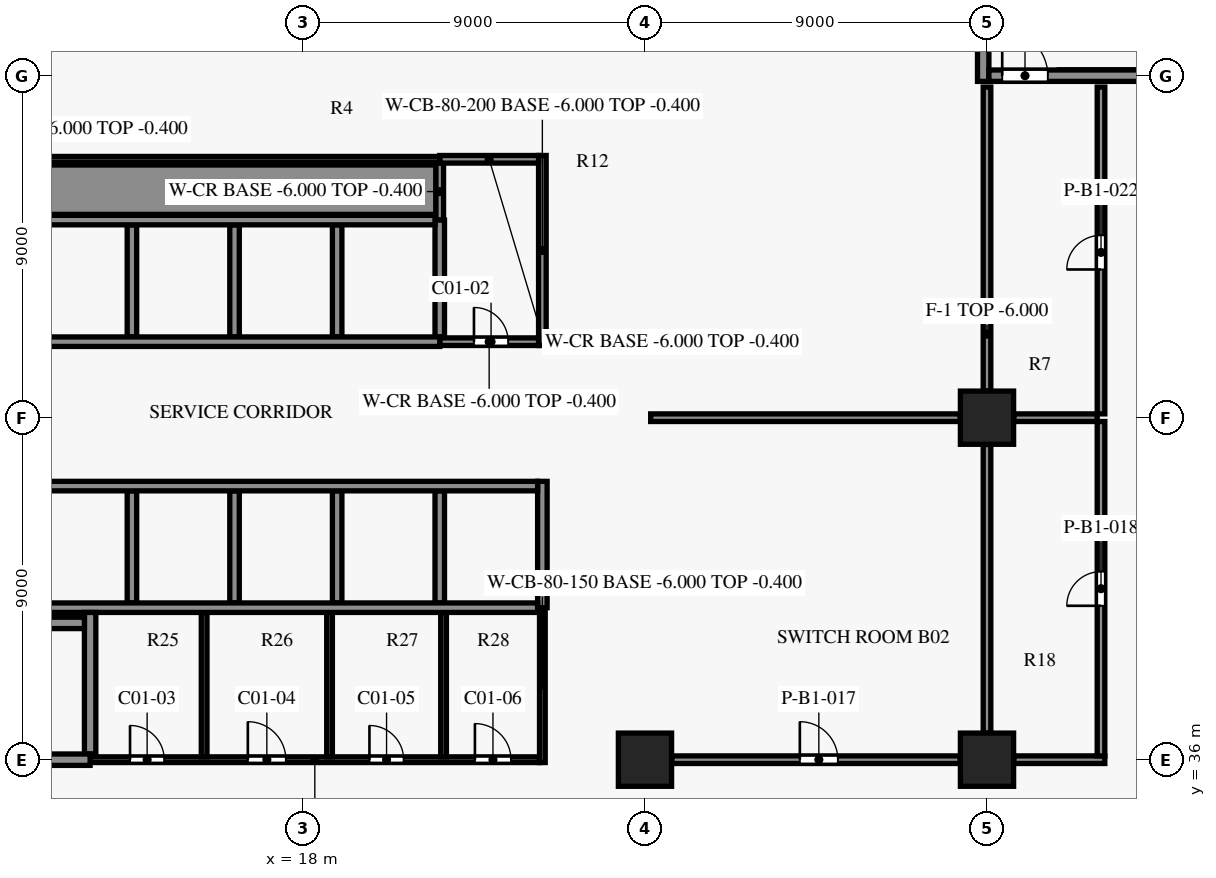
"""IFC4 building model, lengths in metres.
Left out: names, types, materials, properties, quantities, classifications, styles, units other than length and angle.
Written with IfcOpenShell. Run it as: python <this file> out.ifc"""

import sys

from ifc_helpers import new_model, si_unit, direction, frame, frame_2d, origin, origin_2d, place, context, subcontext, project, spatial, rectangle, extrude, element, fill, save


model = new_model("IFC4")
c1 = context("Model", 3, precision=1e-05, world=origin(), true_north=direction((0.0, 1.0)))
c2 = subcontext(c1, "Body", "Model", "MODEL_VIEW")
j1 = project(units=[si_unit("LENGTHUNIT", "METRE"), si_unit("PLANEANGLEUNIT", "RADIAN")], contexts=[c1])
p1 = place(None, origin())
s1 = spatial("IfcSite", under=j1, at=p1, CompositionType="ELEMENT")
p2 = place(p1, origin())
s2 = spatial("IfcBuilding", under=s1, at=p2, CompositionType="ELEMENT")
p3 = place(p2, frame((0.0, 0.0, -6.0)))
s3 = spatial("IfcBuildingStorey", under=s2, at=p3, CompositionType="ELEMENT", Elevation=-6.0)
for number, where, z_axis, x_axis in (
    (1, (27.0, 36.0, 0.0), (0.0, 0.0, 1.0), (1.0, 0.0, 0.0)),
    (2, (36.0, 36.0, 0.0), (0.0, 0.0, 1.0), (1.0, 0.0, 0.0)),
    (3, (36.0, 45.0, 0.0), (0.0, 0.0, 1.0), (1.0, 0.0, 0.0)),
):
    element("IfcColumn", number, at=place(p3, frame(where, z_axis=z_axis, x_axis=x_axis)), inside=s3, PredefinedType="COLUMN", context=c2, shape_type="SweptSolid", body=[
        extrude(rectangle(XDim=1.4, YDim=1.4, at=origin_2d()), origin(), (0.0, 0.0, 1.0), 6.0),
    ])
p4 = place(p3, frame((12.4, 36.0, 0.0), z_axis=(0.0, 0.0, 1.0), x_axis=(1.0, 0.0, 0.0)))
e4 = element("IfcWall", 4, at=p4, inside=s3, PredefinedType="SHEAR", context=c2, shape_type="SweptSolid", body=[
    extrude(rectangle(XDim=11.825, YDim=0.15, at=frame_2d((5.913, 0.0))), origin(), (0.0, 0.0, 1.0), 5.6),
])
p5 = place(p4, frame((1.05, 0.0, 0.0)))
e5 = element("IfcOpeningElement", 5, at=p5, cuts=e4, PredefinedType="OPENING", context=c2, shape_type="SweptSolid", body=[
    extrude(rectangle(XDim=0.9, YDim=2.1, at=frame_2d((0.45, 1.05))), frame((0.0, 0.085, 0.0), z_axis=(0.0, -1.0, 0.0), x_axis=(1.0, 0.0, 0.0)), (0.0, 0.0, 1.0), 0.17),
])
p6 = place(p4, frame((4.15, 0.0, 0.0)))
e6 = element("IfcOpeningElement", 6, at=p6, cuts=e4, PredefinedType="OPENING", context=c2, shape_type="SweptSolid", body=[
    extrude(rectangle(XDim=1.0, YDim=2.1, at=frame_2d((0.5, 1.05))), frame((0.0, 0.085, 0.0), z_axis=(0.0, -1.0, 0.0), x_axis=(1.0, 0.0, 0.0)), (0.0, 0.0, 1.0), 0.17),
])
p7 = place(p4, frame((7.35, 0.0, 0.0)))
e7 = element("IfcOpeningElement", 7, at=p7, cuts=e4, PredefinedType="OPENING", context=c2, shape_type="SweptSolid", body=[
    extrude(rectangle(XDim=0.9, YDim=2.1, at=frame_2d((0.45, 1.05))), frame((0.0, 0.085, 0.0), z_axis=(0.0, -1.0, 0.0), x_axis=(1.0, 0.0, 0.0)), (0.0, 0.0, 1.0), 0.17),
])
p8 = place(p4, frame((10.125, 0.0, 0.0)))
e8 = element("IfcOpeningElement", 8, at=p8, cuts=e4, PredefinedType="OPENING", context=c2, shape_type="SweptSolid", body=[
    extrude(rectangle(XDim=0.95, YDim=2.1, at=frame_2d((0.475, 1.05))), frame((0.0, 0.085, 0.0), z_axis=(0.0, -1.0, 0.0), x_axis=(1.0, 0.0, 0.0)), (0.0, 0.0, 1.0), 0.17),
])
p9 = place(p3, frame((4.4, 36.0, 0.0), z_axis=(0.0, 0.0, 1.0), x_axis=(1.0, 0.0, 0.0)))
e9 = element("IfcWall", 9, at=p9, inside=s3, PredefinedType="SHEAR", context=c2, shape_type="SweptSolid", body=[
    extrude(rectangle(XDim=8.0, YDim=0.3, at=frame_2d((4.0, 0.0))), origin(), (0.0, 0.0, 1.0), 5.6),
])
p10 = place(p9, frame((0.3, 0.0, 0.0)))
e10 = element("IfcOpeningElement", 10, at=p10, cuts=e9, PredefinedType="OPENING", context=c2, shape_type="SweptSolid", body=[
    extrude(rectangle(XDim=1.5, YDim=2.2, at=frame_2d((0.75, 1.1))), frame((0.0, 0.16, 0.0), z_axis=(0.0, -1.0, 0.0), x_axis=(1.0, 0.0, 0.0)), (0.0, 0.0, 1.0), 0.32),
])
p11 = place(p3, frame((4.55, 39.6, 0.0), z_axis=(0.0, 0.0, 1.0), x_axis=(1.0, 0.0, 0.0)))
e11 = element("IfcWall", 11, at=p11, inside=s3, PredefinedType="SHEAR", context=c2, shape_type="SweptSolid", body=[
    extrude(rectangle(XDim=7.7, YDim=0.3, at=frame_2d((3.85, 0.0))), origin(), (0.0, 0.0, 1.0), 5.6),
])
for number, where, z_axis, x_axis in (
    (12, (8.1, 40.0, 0.0), (0.0, 0.0, 1.0), (1.0, 0.0, 0.0)),
    (13, (8.1, 43.2, 0.0), (0.0, 0.0, 1.0), (1.0, 0.0, 0.0)),
):
    element("IfcWall", number, at=place(p3, frame(where, z_axis=z_axis, x_axis=x_axis)), inside=s3, PredefinedType="SHEAR", context=c2, shape_type="SweptSolid", body=[
        extrude(rectangle(XDim=16.075, YDim=0.25, at=frame_2d((8.038, 0.0))), origin(), (0.0, 0.0, 1.0), 5.6),
    ])
p12 = place(p3, frame((21.6, 47.0, 0.0), z_axis=(0.0, 0.0, 1.0), x_axis=(1.0, 0.0, 0.0)))
e14 = element("IfcWall", 14, at=p12, inside=s3, PredefinedType="PARTITIONING", context=c2, shape_type="SweptSolid", body=[
    extrude(rectangle(XDim=2.6, YDim=0.2, at=frame_2d((1.3, 0.0))), origin(), (0.0, 0.0, 1.0), 5.6),
])
p13 = place(p12, frame((0.9, 0.0, 0.0)))
e15 = element("IfcOpeningElement", 15, at=p13, cuts=e14, PredefinedType="OPENING", context=c2, shape_type="SweptSolid", body=[
    extrude(rectangle(XDim=0.9, YDim=2.1, at=frame_2d((0.45, 1.05))), frame((0.0, 0.11, 0.0), z_axis=(0.0, -1.0, 0.0), x_axis=(1.0, 0.0, 0.0)), (0.0, 0.0, 1.0), 0.22),
])
p14 = place(p3, frame((8.1, 47.0, 0.0), z_axis=(0.0, 0.0, 1.0), x_axis=(1.0, 0.0, 0.0)))
e16 = element("IfcWall", 16, at=p14, inside=s3, PredefinedType="SHEAR", context=c2, shape_type="SweptSolid", body=[
    extrude(rectangle(XDim=13.5, YDim=0.25, at=frame_2d((6.75, 0.0))), origin(), (0.0, 0.0, 1.0), 5.6),
])
p15 = place(p3, frame((8.1, 50.2, 0.0), z_axis=(0.0, 0.0, 1.0), x_axis=(1.0, 0.0, 0.0)))
e17 = element("IfcWall", 17, at=p15, inside=s3, PredefinedType="SHEAR", context=c2, shape_type="SweptSolid", body=[
    extrude(rectangle(XDim=13.375, YDim=0.25, at=frame_2d((6.688, 0.0))), origin(), (0.0, 0.0, 1.0), 5.6),
])
p16 = place(p3, frame((-0.125, 51.0, 0.0), z_axis=(0.0, 0.0, 1.0), x_axis=(1.0, 0.0, 0.0)))
e18 = element("IfcWall", 18, at=p16, inside=s3, PredefinedType="SHEAR", context=c2, shape_type="SweptSolid", body=[
    extrude(rectangle(XDim=21.625, YDim=1.3, at=frame_2d((10.812, 0.0))), origin(), (0.0, 0.0, 1.0), 5.6),
])
p17 = place(p3, frame((8.1, 51.8, 0.0), z_axis=(0.0, 0.0, 1.0), x_axis=(1.0, 0.0, 0.0)))
e19 = element("IfcWall", 19, at=p17, inside=s3, PredefinedType="PARTITIONING", context=c2, shape_type="SweptSolid", body=[
    extrude(rectangle(XDim=13.5, YDim=0.15, at=frame_2d((6.75, 0.0))), origin(), (0.0, 0.0, 1.0), 5.6),
])
p18 = place(p3, frame((21.6, 51.8, 0.0), z_axis=(0.0, 0.0, 1.0), x_axis=(1.0, 0.0, 0.0)))
e20 = element("IfcWall", 20, at=p18, inside=s3, PredefinedType="PARTITIONING", context=c2, shape_type="SweptSolid", body=[
    extrude(rectangle(XDim=2.6, YDim=0.2, at=frame_2d((1.3, 0.0))), origin(), (0.0, 0.0, 1.0), 5.6),
])
p19 = place(p3, frame((36.05, 54.0, 0.0), z_axis=(0.0, 0.0, 1.0), x_axis=(1.0, 0.0, 0.0)))
e21 = element("IfcWall", 21, at=p19, inside=s3, PredefinedType="SHEAR", context=c2, shape_type="SweptSolid", body=[
    extrude(rectangle(XDim=7.7, YDim=0.3, at=frame_2d((3.85, 0.0))), origin(), (0.0, 0.0, 1.0), 5.6),
])
p20 = place(p19, frame((0.35, 0.0, 0.0)))
e22 = element("IfcOpeningElement", 22, at=p20, cuts=e21, PredefinedType="OPENING", context=c2, shape_type="SweptSolid", body=[
    extrude(rectangle(XDim=1.2, YDim=2.2, at=frame_2d((0.6, 1.1))), frame((0.0, 0.16, 0.0), z_axis=(0.0, -1.0, 0.0), x_axis=(1.0, 0.0, 0.0)), (0.0, 0.0, 1.0), 0.32),
])
p21 = place(p3, frame((12.4, 36.15, 0.0), z_axis=(0.0, 0.0, 1.0), x_axis=(0.0, 1.0, 0.0)))
e23 = element("IfcWall", 23, at=p21, inside=s3, PredefinedType="SHEAR", context=c2, shape_type="SweptSolid", body=[
    extrude(rectangle(XDim=3.725, YDim=0.3, at=frame_2d((1.863, 0.0))), origin(), (0.0, 0.0, 1.0), 5.6),
])
for number, where, z_axis, x_axis in (
    (24, (13.5, 40.125, 0.0), (0.0, 0.0, 1.0), (0.0, 1.0, 0.0)),
    (25, (13.5, 47.125, 0.0), (0.0, 0.0, 1.0), (0.0, 1.0, 0.0)),
):
    element("IfcWall", number, at=place(p3, frame(where, z_axis=z_axis, x_axis=x_axis)), inside=s3, PredefinedType="SHEAR", context=c2, shape_type="SweptSolid", body=[
        extrude(rectangle(XDim=2.95, YDim=0.25, at=frame_2d((1.475, 0.0))), origin(), (0.0, 0.0, 1.0), 5.6),
    ])
p22 = place(p3, frame((15.4, 36.075, 0.0), z_axis=(0.0, 0.0, 1.0), x_axis=(0.0, 1.0, 0.0)))
e26 = element("IfcWall", 26, at=p22, inside=s3, PredefinedType="PARTITIONING", context=c2, shape_type="SweptSolid", body=[
    extrude(rectangle(XDim=3.8, YDim=0.15, at=frame_2d((1.9, 0.0))), origin(), (0.0, 0.0, 1.0), 5.6),
])
for number, where, z_axis, x_axis in (
    (27, (16.2, 40.125, 0.0), (0.0, 0.0, 1.0), (0.0, 1.0, 0.0)),
    (28, (16.2, 47.125, 0.0), (0.0, 0.0, 1.0), (0.0, 1.0, 0.0)),
):
    element("IfcWall", number, at=place(p3, frame(where, z_axis=z_axis, x_axis=x_axis)), inside=s3, PredefinedType="SHEAR", context=c2, shape_type="SweptSolid", body=[
        extrude(rectangle(XDim=2.95, YDim=0.25, at=frame_2d((1.475, 0.0))), origin(), (0.0, 0.0, 1.0), 5.6),
    ])
p23 = place(p3, frame((18.7, 36.075, 0.0), z_axis=(0.0, 0.0, 1.0), x_axis=(0.0, 1.0, 0.0)))
e29 = element("IfcWall", 29, at=p23, inside=s3, PredefinedType="PARTITIONING", context=c2, shape_type="SweptSolid", body=[
    extrude(rectangle(XDim=3.8, YDim=0.15, at=frame_2d((1.9, 0.0))), origin(), (0.0, 0.0, 1.0), 5.6),
])
for number, where, z_axis, x_axis in (
    (30, (18.9, 40.125, 0.0), (0.0, 0.0, 1.0), (0.0, 1.0, 0.0)),
    (31, (18.9, 47.125, 0.0), (0.0, 0.0, 1.0), (0.0, 1.0, 0.0)),
):
    element("IfcWall", number, at=place(p3, frame(where, z_axis=z_axis, x_axis=x_axis)), inside=s3, PredefinedType="SHEAR", context=c2, shape_type="SweptSolid", body=[
        extrude(rectangle(XDim=2.95, YDim=0.25, at=frame_2d((1.475, 0.0))), origin(), (0.0, 0.0, 1.0), 5.6),
    ])
p24 = place(p3, frame((21.6, 50.2, 0.0), z_axis=(0.0, 0.0, 1.0), x_axis=(0.0, 1.0, 0.0)))
e32 = element("IfcWall", 32, at=p24, inside=s3, PredefinedType="PARTITIONING", context=c2, shape_type="SweptSolid", body=[
    extrude(rectangle(XDim=1.5, YDim=0.2, at=frame_2d((0.75, 0.0))), origin(), (0.0, 0.0, 1.0), 5.6),
])
p25 = place(p3, frame((21.6, 40.125, 0.0), z_axis=(0.0, 0.0, 1.0), x_axis=(0.0, 1.0, 0.0)))
e33 = element("IfcWall", 33, at=p25, inside=s3, PredefinedType="SHEAR", context=c2, shape_type="SweptSolid", body=[
    extrude(rectangle(XDim=2.95, YDim=0.25, at=frame_2d((1.475, 0.0))), origin(), (0.0, 0.0, 1.0), 5.6),
])
p26 = place(p3, frame((21.6, 47.125, 0.0), z_axis=(0.0, 0.0, 1.0), x_axis=(0.0, 1.0, 0.0)))
e34 = element("IfcWall", 34, at=p26, inside=s3, PredefinedType="SHEAR", context=c2, shape_type="SweptSolid", body=[
    extrude(rectangle(XDim=3.075, YDim=0.25, at=frame_2d((1.538, 0.0))), origin(), (0.0, 0.0, 1.0), 5.6),
])
p27 = place(p3, frame((21.7, 36.075, 0.0), z_axis=(0.0, 0.0, 1.0), x_axis=(0.0, 1.0, 0.0)))
e35 = element("IfcWall", 35, at=p27, inside=s3, PredefinedType="PARTITIONING", context=c2, shape_type="SweptSolid", body=[
    extrude(rectangle(XDim=3.8, YDim=0.15, at=frame_2d((1.9, 0.0))), origin(), (0.0, 0.0, 1.0), 5.6),
])
p28 = place(p3, frame((24.3, 35.925, 0.0), z_axis=(0.0, 0.0, 1.0), x_axis=(0.0, 1.0, 0.0)))
e36 = element("IfcWall", 36, at=p28, inside=s3, PredefinedType="SHEAR", context=c2, shape_type="SweptSolid", body=[
    extrude(rectangle(XDim=4.075, YDim=0.15, at=frame_2d((2.038, 0.0))), origin(), (0.0, 0.0, 1.0), 5.6),
])
p29 = place(p3, frame((24.3, 46.9, 0.0), z_axis=(0.0, 0.0, 1.0), x_axis=(0.0, 1.0, 0.0)))
e37 = element("IfcWall", 37, at=p29, inside=s3, PredefinedType="SHEAR", context=c2, shape_type="SweptSolid", body=[
    extrude(rectangle(XDim=5.0, YDim=0.2, at=frame_2d((2.5, 0.0))), origin(), (0.0, 0.0, 1.0), 5.6),
])
p30 = place(p3, frame((24.3, 40.0, 0.0), z_axis=(0.0, 0.0, 1.0), x_axis=(0.0, 1.0, 0.0)))
e38 = element("IfcWall", 38, at=p30, inside=s3, PredefinedType="SHEAR", context=c2, shape_type="SweptSolid", body=[
    extrude(rectangle(XDim=3.325, YDim=0.25, at=frame_2d((1.663, 0.0))), origin(), (0.0, 0.0, 1.0), 5.6),
])
p31 = place(p3, frame((35.9, 53.85, 0.0), z_axis=(0.0, 0.0, 1.0), x_axis=(0.0, 1.0, 0.0)))
e39 = element("IfcWall", 39, at=p31, inside=s3, PredefinedType="SHEAR", context=c2, shape_type="SweptSolid", body=[
    extrude(rectangle(XDim=3.9, YDim=0.3, at=frame_2d((1.95, 0.0))), origin(), (0.0, 0.0, 1.0), 5.6),
])
p32 = place(p3, frame((27.705, 36.0, 0.0), z_axis=(0.0, 0.0, 1.0), x_axis=(1.0, 0.0, 0.0)))
e40 = element("IfcWall", 40, at=p32, inside=s3, PredefinedType="PARTITIONING", context=c2, shape_type="SweptSolid", body=[
    extrude(rectangle(XDim=7.59, YDim=0.2, at=frame_2d((3.795, 0.0))), origin(), (0.0, 0.0, 1.0), 5.58),
])
p33 = place(p32, frame((3.37, 0.0, 0.0)))
e41 = element("IfcOpeningElement", 41, at=p33, cuts=e40, PredefinedType="OPENING", context=c2, shape_type="SweptSolid", body=[
    extrude(rectangle(XDim=1.0, YDim=2.1, at=frame_2d((0.5, 1.05))), frame((0.0, 0.11, 0.0), z_axis=(0.0, -1.0, 0.0), x_axis=(1.0, 0.0, 0.0)), (0.0, 0.0, 1.0), 0.22),
])
p34 = place(p3, frame((36.705, 36.0, 0.0), z_axis=(0.0, 0.0, 1.0), x_axis=(1.0, 0.0, 0.0)))
e42 = element("IfcWall", 42, at=p34, inside=s3, PredefinedType="PARTITIONING", context=c2, shape_type="SweptSolid", body=[
    extrude(rectangle(XDim=2.395, YDim=0.2, at=frame_2d((1.198, 0.0))), origin(), (0.0, 0.0, 1.0), 5.58),
])
p35 = place(p3, frame((39.0, 36.1, 0.0), z_axis=(0.0, 0.0, 1.0), x_axis=(0.0, 1.0, 0.0)))
e43 = element("IfcWall", 43, at=p35, inside=s3, PredefinedType="PARTITIONING", context=c2, shape_type="SweptSolid", body=[
    extrude(rectangle(XDim=8.8, YDim=0.2, at=frame_2d((4.4, 0.0))), origin(), (0.0, 0.0, 1.0), 5.58),
])
p36 = place(p35, frame((3.95, 0.0, 0.0)))
e44 = element("IfcOpeningElement", 44, at=p36, cuts=e43, PredefinedType="OPENING", context=c2, shape_type="SweptSolid", body=[
    extrude(rectangle(XDim=0.9, YDim=2.1, at=frame_2d((0.45, 1.05))), frame((0.0, 0.11, 0.0), z_axis=(0.0, -1.0, 0.0), x_axis=(1.0, 0.0, 0.0)), (0.0, 0.0, 1.0), 0.22),
])
p37 = place(p3, frame((36.0, 44.295, 0.0), z_axis=(0.0, 0.0, 1.0), x_axis=(0.0, -1.0, 0.0)))
e45 = element("IfcWall", 45, at=p37, inside=s3, PredefinedType="PARTITIONING", context=c2, shape_type="SweptSolid", body=[
    extrude(rectangle(XDim=7.59, YDim=0.2, at=frame_2d((3.795, 0.0))), origin(), (0.0, 0.0, 1.0), 5.58),
])
p38 = place(p3, frame((27.15, 45.0, 0.0), z_axis=(0.0, 0.0, 1.0), x_axis=(1.0, 0.0, 0.0)))
e46 = element("IfcWall", 46, at=p38, inside=s3, PredefinedType="PARTITIONING", context=c2, shape_type="SweptSolid", body=[
    extrude(rectangle(XDim=8.145, YDim=0.2, at=frame_2d((4.073, 0.0))), origin(), (0.0, 0.0, 1.0), 5.58),
])
p39 = place(p3, frame((36.705, 45.0, 0.0), z_axis=(0.0, 0.0, 1.0), x_axis=(1.0, 0.0, 0.0)))
e47 = element("IfcWall", 47, at=p39, inside=s3, PredefinedType="PARTITIONING", context=c2, shape_type="SweptSolid", body=[
    extrude(rectangle(XDim=2.195, YDim=0.2, at=frame_2d((1.097, 0.0))), origin(), (0.0, 0.0, 1.0), 5.58),
])
p40 = place(p3, frame((39.0, 45.1, 0.0), z_axis=(0.0, 0.0, 1.0), x_axis=(0.0, 1.0, 0.0)))
e48 = element("IfcWall", 48, at=p40, inside=s3, PredefinedType="PARTITIONING", context=c2, shape_type="SweptSolid", body=[
    extrude(rectangle(XDim=8.6, YDim=0.2, at=frame_2d((4.3, 0.0))), origin(), (0.0, 0.0, 1.0), 5.58),
])
p41 = place(p40, frame((3.8, 0.0, 0.0)))
e49 = element("IfcOpeningElement", 49, at=p41, cuts=e48, PredefinedType="OPENING", context=c2, shape_type="SweptSolid", body=[
    extrude(rectangle(XDim=0.9, YDim=2.1, at=frame_2d((0.45, 1.05))), frame((0.0, 0.11, 0.0), z_axis=(0.0, -1.0, 0.0), x_axis=(1.0, 0.0, 0.0)), (0.0, 0.0, 1.0), 0.22),
])
p42 = place(p3, frame((36.0, 45.705, 0.0), z_axis=(0.0, 0.0, 1.0), x_axis=(0.0, 1.0, 0.0)))
e50 = element("IfcWall", 50, at=p42, inside=s3, PredefinedType="PARTITIONING", context=c2, shape_type="SweptSolid", body=[
    extrude(rectangle(XDim=7.995, YDim=0.2, at=frame_2d((3.998, 0.0))), origin(), (0.0, 0.0, 1.0), 5.58),
])
p43 = place(p13, origin())
e51 = element("IfcDoor", 51, at=p43, inside=s3, OperationType="SINGLE_SWING_LEFT", PredefinedType="DOOR", context=c2, shape_type="SweptSolid", body=[
    extrude(rectangle(XDim=0.9, YDim=2.1, at=frame_2d((0.45, 1.05))), frame((0.0, 0.025, 0.0), z_axis=(0.0, -1.0, 0.0), x_axis=(1.0, 0.0, 0.0)), (0.0, 0.0, 1.0), 0.05),
])
fill(e15, e51)
p44 = place(p5, origin())
e52 = element("IfcDoor", 52, at=p44, inside=s3, OperationType="SINGLE_SWING_RIGHT", PredefinedType="DOOR", context=c2, shape_type="SweptSolid", body=[
    extrude(rectangle(XDim=0.9, YDim=2.1, at=frame_2d((0.45, 1.05))), frame((0.0, 0.025, 0.0), z_axis=(0.0, -1.0, 0.0), x_axis=(1.0, 0.0, 0.0)), (0.0, 0.0, 1.0), 0.05),
])
fill(e5, e52)
p45 = place(p6, origin())
e53 = element("IfcDoor", 53, at=p45, inside=s3, OperationType="SINGLE_SWING_LEFT", PredefinedType="DOOR", context=c2, shape_type="SweptSolid", body=[
    extrude(rectangle(XDim=1.0, YDim=2.1, at=frame_2d((0.5, 1.05))), frame((0.0, 0.025, 0.0), z_axis=(0.0, -1.0, 0.0), x_axis=(1.0, 0.0, 0.0)), (0.0, 0.0, 1.0), 0.05),
])
fill(e6, e53)
p46 = place(p7, origin())
e54 = element("IfcDoor", 54, at=p46, inside=s3, OperationType="SINGLE_SWING_RIGHT", PredefinedType="DOOR", context=c2, shape_type="SweptSolid", body=[
    extrude(rectangle(XDim=0.9, YDim=2.1, at=frame_2d((0.45, 1.05))), frame((0.0, 0.025, 0.0), z_axis=(0.0, -1.0, 0.0), x_axis=(1.0, 0.0, 0.0)), (0.0, 0.0, 1.0), 0.05),
])
fill(e7, e54)
p47 = place(p8, origin())
e55 = element("IfcDoor", 55, at=p47, inside=s3, OperationType="SINGLE_SWING_LEFT", PredefinedType="DOOR", context=c2, shape_type="SweptSolid", body=[
    extrude(rectangle(XDim=0.95, YDim=2.1, at=frame_2d((0.475, 1.05))), frame((0.0, 0.025, 0.0), z_axis=(0.0, -1.0, 0.0), x_axis=(1.0, 0.0, 0.0)), (0.0, 0.0, 1.0), 0.05),
])
fill(e8, e55)
p48 = place(p20, origin())
e56 = element("IfcDoor", 56, at=p48, inside=s3, OperationType="SINGLE_SWING_LEFT", PredefinedType="DOOR", context=c2, shape_type="SweptSolid", body=[
    extrude(rectangle(XDim=1.2, YDim=2.2, at=frame_2d((0.6, 1.1))), frame((0.0, 0.025, 0.0), z_axis=(0.0, -1.0, 0.0), x_axis=(1.0, 0.0, 0.0)), (0.0, 0.0, 1.0), 0.05),
])
fill(e22, e56)
p49 = place(p33, origin())
e57 = element("IfcDoor", 57, at=p49, inside=s3, OperationType="SINGLE_SWING_RIGHT", PredefinedType="DOOR", context=c2, shape_type="SweptSolid", body=[
    extrude(rectangle(XDim=1.0, YDim=2.1, at=frame_2d((0.5, 1.05))), frame((0.0, 0.025, 0.0), z_axis=(0.0, -1.0, 0.0), x_axis=(1.0, 0.0, 0.0)), (0.0, 0.0, 1.0), 0.05),
])
fill(e41, e57)
p50 = place(p36, origin())
e58 = element("IfcDoor", 58, at=p50, inside=s3, OperationType="SINGLE_SWING_RIGHT", PredefinedType="DOOR", context=c2, shape_type="SweptSolid", body=[
    extrude(rectangle(XDim=0.9, YDim=2.1, at=frame_2d((0.45, 1.05))), frame((0.0, 0.025, 0.0), z_axis=(0.0, -1.0, 0.0), x_axis=(1.0, 0.0, 0.0)), (0.0, 0.0, 1.0), 0.05),
])
fill(e44, e58)
p51 = place(p41, origin())
e59 = element("IfcDoor", 59, at=p51, inside=s3, OperationType="SINGLE_SWING_RIGHT", PredefinedType="DOOR", context=c2, shape_type="SweptSolid", body=[
    extrude(rectangle(XDim=0.9, YDim=2.1, at=frame_2d((0.45, 1.05))), frame((0.0, 0.025, 0.0), z_axis=(0.0, -1.0, 0.0), x_axis=(1.0, 0.0, 0.0)), (0.0, 0.0, 1.0), 0.05),
])
fill(e49, e59)
save(model, sys.argv[1])
